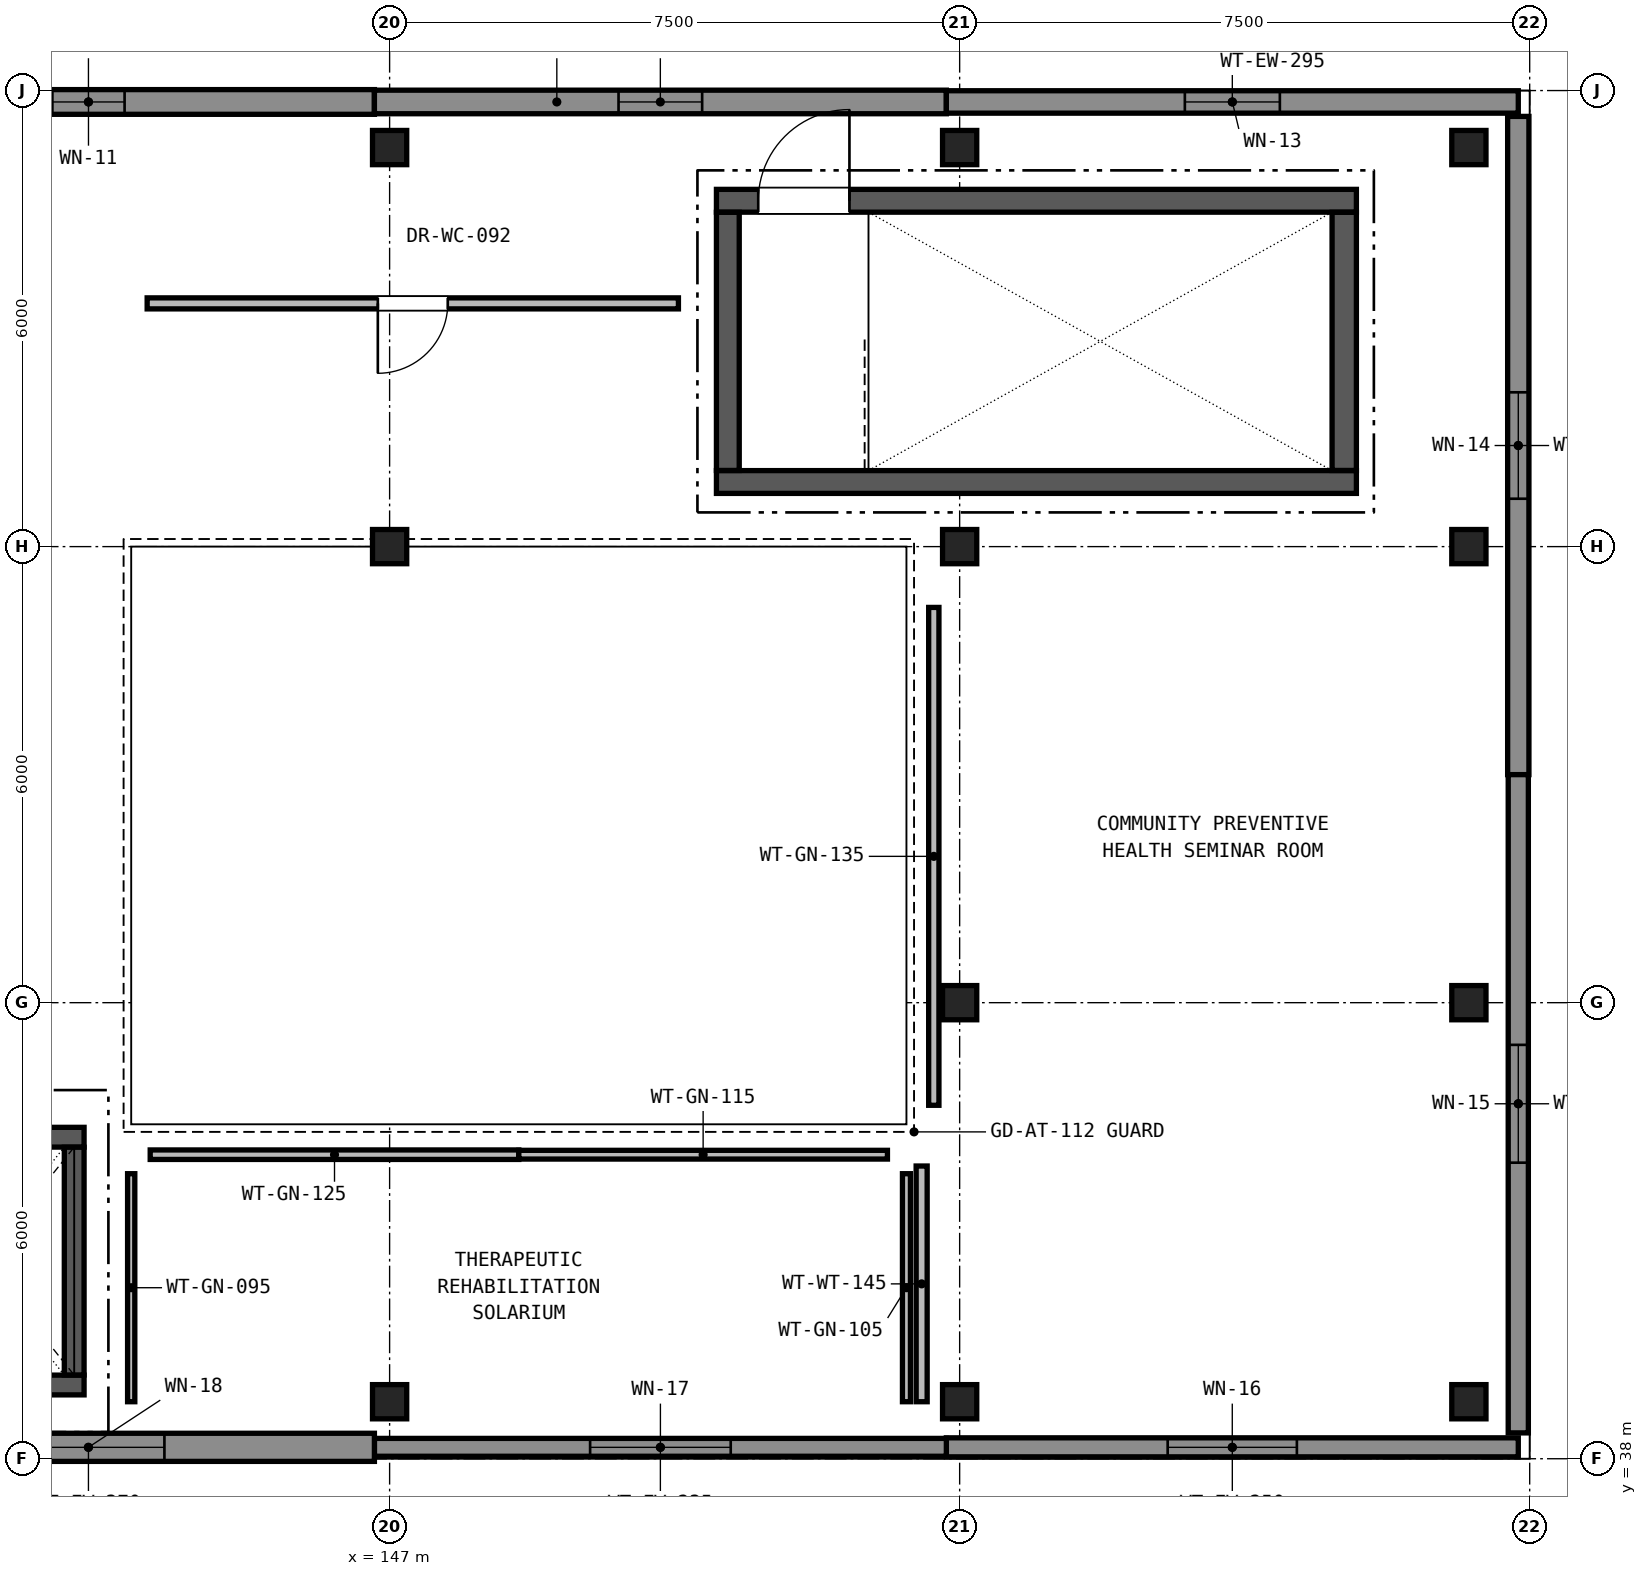
"""IFC4 building model, lengths in metres.
Left out: names, types, materials, properties, quantities, classifications, styles, units other than length and angle.
Written with IfcOpenShell. Run it as: python <this file> out.ifc"""

import sys

from ifc_helpers import new_model, si_unit, direction, frame, frame_2d, origin, origin_2d, place, context, subcontext, project, spatial, rectangle, extrude, element, fill, save


model = new_model("IFC4")
c1 = context("Model", 3, precision=1e-05, world=origin(), true_north=direction((0.0, 1.0)))
c2 = subcontext(c1, "Body", "Model", "MODEL_VIEW")
j1 = project(units=[si_unit("LENGTHUNIT", "METRE"), si_unit("PLANEANGLEUNIT", "RADIAN")], contexts=[c1])
p1 = place(None, origin())
s1 = spatial("IfcSite", under=j1, at=p1, CompositionType="ELEMENT")
p2 = place(p1, origin())
s2 = spatial("IfcBuilding", under=s1, at=p2, CompositionType="ELEMENT")
p3 = place(p2, frame((0.0, 0.0, 5.1)))
s3 = spatial("IfcBuildingStorey", under=s2, at=p3, CompositionType="ELEMENT", Elevation=5.1)
for number, where, z_axis, x_axis in (
    (1, (147.0, 38.75, 0.0), (0.0, 0.0, 1.0), (1.0, 0.0, 0.0)),
    (2, (147.0, 50.0, 0.0), (0.0, 0.0, 1.0), (1.0, 0.0, 0.0)),
    (3, (147.0, 55.25, 0.0), (0.0, 0.0, 1.0), (1.0, 0.0, 0.0)),
    (4, (154.5, 38.75, 0.0), (0.0, 0.0, 1.0), (1.0, 0.0, 0.0)),
    (5, (154.5, 50.0, 0.0), (0.0, 0.0, 1.0), (1.0, 0.0, 0.0)),
    (6, (154.5, 55.25, 0.0), (0.0, 0.0, 1.0), (1.0, 0.0, 0.0)),
    (7, (161.2, 38.75, 0.0), (0.0, 0.0, 1.0), (1.0, 0.0, 0.0)),
    (8, (161.2, 44.0, 0.0), (0.0, 0.0, 1.0), (1.0, 0.0, 0.0)),
    (9, (161.2, 50.0, 0.0), (0.0, 0.0, 1.0), (1.0, 0.0, 0.0)),
    (10, (161.2, 55.25, 0.0), (0.0, 0.0, 1.0), (1.0, 0.0, 0.0)),
    (11, (154.5, 44.0, 0.0), (0.0, 0.0, 1.0), (1.0, 0.0, 0.0)),
):
    element("IfcColumn", number, at=place(p3, frame(where, z_axis=z_axis, x_axis=x_axis)), inside=s3, PredefinedType="COLUMN", context=c2, shape_type="SweptSolid", body=[
        extrude(rectangle(XDim=0.45, YDim=0.45, at=origin_2d()), origin(), (0.0, 0.0, 1.0), 4.42),
    ])
p4 = place(p3, frame((139.275, 55.85, 0.0), z_axis=(0.0, 0.0, 1.0), x_axis=(1.0, 0.0, 0.0)))
e12 = element("IfcWall", 12, at=p4, inside=s3, PredefinedType="SOLIDWALL", context=c2, shape_type="SweptSolid", body=[
    extrude(rectangle(XDim=7.525, YDim=0.325, at=frame_2d((3.763, 0.0))), origin(), (0.0, 0.0, 1.0), 4.205),
])
p5 = place(p4, frame((3.288, 0.0, 0.9)))
e13 = element("IfcOpeningElement", 13, at=p5, cuts=e12, PredefinedType="OPENING", context=c2, shape_type="SweptSolid", body=[
    extrude(rectangle(XDim=0.95, YDim=1.75, at=frame_2d((0.475, 0.875))), frame((0.0, 0.172, 0.0), z_axis=(0.0, -1.0, 0.0), x_axis=(1.0, 0.0, 0.0)), (0.0, 0.0, 1.0), 0.345),
])
p6 = place(p3, frame((146.8, 55.85, 0.0), z_axis=(0.0, 0.0, 1.0), x_axis=(1.0, 0.0, 0.0)))
e14 = element("IfcWall", 14, at=p6, inside=s3, PredefinedType="SOLIDWALL", context=c2, shape_type="SweptSolid", body=[
    extrude(rectangle(XDim=7.525, YDim=0.31, at=frame_2d((3.762, 0.0))), origin(), (0.0, 0.0, 1.0), 4.205),
])
p7 = place(p6, frame((3.212, 0.0, 0.9)))
e15 = element("IfcOpeningElement", 15, at=p7, cuts=e14, PredefinedType="OPENING", context=c2, shape_type="SweptSolid", body=[
    extrude(rectangle(XDim=1.1, YDim=1.75, at=frame_2d((0.55, 0.875))), frame((0.0, 0.165, 0.0), z_axis=(0.0, -1.0, 0.0), x_axis=(1.0, 0.0, 0.0)), (0.0, 0.0, 1.0), 0.33),
])
p8 = place(p3, frame((154.325, 55.85, 0.0), z_axis=(0.0, 0.0, 1.0), x_axis=(1.0, 0.0, 0.0)))
e16 = element("IfcWall", 16, at=p8, inside=s3, PredefinedType="SOLIDWALL", context=c2, shape_type="SweptSolid", body=[
    extrude(rectangle(XDim=7.525, YDim=0.295, at=frame_2d((3.763, 0.0))), origin(), (0.0, 0.0, 1.0), 4.205),
])
p9 = place(p8, frame((3.138, 0.0, 0.9)))
e17 = element("IfcOpeningElement", 17, at=p9, cuts=e16, PredefinedType="OPENING", context=c2, shape_type="SweptSolid", body=[
    extrude(rectangle(XDim=1.25, YDim=1.75, at=frame_2d((0.625, 0.875))), frame((0.0, 0.157, 0.0), z_axis=(0.0, -1.0, 0.0), x_axis=(1.0, 0.0, 0.0)), (0.0, 0.0, 1.0), 0.315),
])
p10 = place(p3, frame((161.85, 55.66, 0.0), z_axis=(0.0, 0.0, 1.0), x_axis=(0.0, -1.0, 0.0)))
e18 = element("IfcWall", 18, at=p10, inside=s3, PredefinedType="SOLIDWALL", context=c2, shape_type="SweptSolid", body=[
    extrude(rectangle(XDim=8.66, YDim=0.28, at=frame_2d((4.33, 0.0))), origin(), (0.0, 0.0, 1.0), 4.205),
])
p11 = place(p10, frame((3.63, 0.0, 0.9)))
e19 = element("IfcOpeningElement", 19, at=p11, cuts=e18, PredefinedType="OPENING", context=c2, shape_type="SweptSolid", body=[
    extrude(rectangle(XDim=1.4, YDim=1.75, at=frame_2d((0.7, 0.875))), frame((0.0, 0.15, 0.0), z_axis=(0.0, -1.0, 0.0), x_axis=(1.0, 0.0, 0.0)), (0.0, 0.0, 1.0), 0.3),
])
p12 = place(p3, frame((161.85, 47.0, 0.0), z_axis=(0.0, 0.0, 1.0), x_axis=(0.0, -1.0, 0.0)))
e20 = element("IfcWall", 20, at=p12, inside=s3, PredefinedType="SOLIDWALL", context=c2, shape_type="SweptSolid", body=[
    extrude(rectangle(XDim=8.66, YDim=0.265, at=frame_2d((4.33, 0.0))), origin(), (0.0, 0.0, 1.0), 4.205),
])
p13 = place(p12, frame((3.555, 0.0, 0.9)))
e21 = element("IfcOpeningElement", 21, at=p13, cuts=e20, PredefinedType="OPENING", context=c2, shape_type="SweptSolid", body=[
    extrude(rectangle(XDim=1.55, YDim=1.75, at=frame_2d((0.775, 0.875))), frame((0.0, 0.142, 0.0), z_axis=(0.0, -1.0, 0.0), x_axis=(1.0, 0.0, 0.0)), (0.0, 0.0, 1.0), 0.285),
])
p14 = place(p3, frame((161.85, 38.15, 0.0), z_axis=(0.0, 0.0, 1.0), x_axis=(-1.0, 0.0, 0.0)))
e22 = element("IfcWall", 22, at=p14, inside=s3, PredefinedType="SOLIDWALL", context=c2, shape_type="SweptSolid", body=[
    extrude(rectangle(XDim=7.525, YDim=0.25, at=frame_2d((3.763, 0.0))), origin(), (0.0, 0.0, 1.0), 4.205),
])
p15 = place(p14, frame((2.913, 0.0, 0.9)))
e23 = element("IfcOpeningElement", 23, at=p15, cuts=e22, PredefinedType="OPENING", context=c2, shape_type="SweptSolid", body=[
    extrude(rectangle(XDim=1.7, YDim=1.75, at=frame_2d((0.85, 0.875))), frame((0.0, 0.135, 0.0), z_axis=(0.0, -1.0, 0.0), x_axis=(1.0, 0.0, 0.0)), (0.0, 0.0, 1.0), 0.27),
])
p16 = place(p3, frame((154.325, 38.15, 0.0), z_axis=(0.0, 0.0, 1.0), x_axis=(-1.0, 0.0, 0.0)))
e24 = element("IfcWall", 24, at=p16, inside=s3, PredefinedType="SOLIDWALL", context=c2, shape_type="SweptSolid", body=[
    extrude(rectangle(XDim=7.525, YDim=0.235, at=frame_2d((3.762, 0.0))), origin(), (0.0, 0.0, 1.0), 4.205),
])
p17 = place(p16, frame((2.837, 0.0, 0.9)))
e25 = element("IfcOpeningElement", 25, at=p17, cuts=e24, PredefinedType="OPENING", context=c2, shape_type="SweptSolid", body=[
    extrude(rectangle(XDim=1.85, YDim=1.75, at=frame_2d((0.925, 0.875))), frame((0.0, 0.127, 0.0), z_axis=(0.0, -1.0, 0.0), x_axis=(1.0, 0.0, 0.0)), (0.0, 0.0, 1.0), 0.255),
])
p18 = place(p3, frame((146.8, 38.15, 0.0), z_axis=(0.0, 0.0, 1.0), x_axis=(-1.0, 0.0, 0.0)))
e26 = element("IfcWall", 26, at=p18, inside=s3, PredefinedType="SOLIDWALL", context=c2, shape_type="SweptSolid", body=[
    extrude(rectangle(XDim=7.525, YDim=0.37, at=frame_2d((3.763, 0.0))), origin(), (0.0, 0.0, 1.0), 4.205),
])
p19 = place(p18, frame((2.763, 0.0, 0.9)))
e27 = element("IfcOpeningElement", 27, at=p19, cuts=e26, PredefinedType="OPENING", context=c2, shape_type="SweptSolid", body=[
    extrude(rectangle(XDim=2.0, YDim=1.75, at=frame_2d((1.0, 0.875))), frame((0.0, 0.195, 0.0), z_axis=(0.0, -1.0, 0.0), x_axis=(1.0, 0.0, 0.0)), (0.0, 0.0, 1.0), 0.39),
])
p20 = place(p3, frame((140.322, 38.97, 0.0), z_axis=(0.0, 0.0, 1.0), x_axis=(1.0, 0.0, 0.0)))
e28 = element("IfcWall", 28, at=p20, inside=s3, PredefinedType="SHEAR", context=c2, shape_type="SweptSolid", body=[
    extrude(rectangle(XDim=2.658, YDim=0.26, at=frame_2d((1.329, 0.0))), origin(), (0.0, 0.0, 1.0), 4.205),
])
p21 = place(p3, frame((140.322, 42.23, 0.0), z_axis=(0.0, 0.0, 1.0), x_axis=(1.0, 0.0, 0.0)))
e29 = element("IfcWall", 29, at=p21, inside=s3, PredefinedType="SHEAR", context=c2, shape_type="SweptSolid", body=[
    extrude(rectangle(XDim=2.658, YDim=0.26, at=frame_2d((1.329, 0.0))), origin(), (0.0, 0.0, 1.0), 4.205),
])
p22 = place(p21, frame((0.679, 0.0, 0.0)))
e30 = element("IfcOpeningElement", 30, at=p22, cuts=e29, PredefinedType="OPENING", context=c2, shape_type="SweptSolid", body=[
    extrude(rectangle(XDim=1.3, YDim=2.2, at=frame_2d((0.65, 1.1))), frame((0.0, 0.14, 0.0), z_axis=(0.0, -1.0, 0.0), x_axis=(1.0, 0.0, 0.0)), (0.0, 0.0, 1.0), 0.28),
])
p23 = place(p3, frame((142.85, 39.102, 0.0), z_axis=(0.0, 0.0, 1.0), x_axis=(0.0, 1.0, 0.0)))
e31 = element("IfcWall", 31, at=p23, inside=s3, PredefinedType="SHEAR", context=c2, shape_type="SweptSolid", body=[
    extrude(rectangle(XDim=2.996, YDim=0.26, at=frame_2d((1.498, 0.0))), origin(), (0.0, 0.0, 1.0), 4.205),
])
p24 = place(p3, frame((151.3, 50.85, 0.0), z_axis=(0.0, 0.0, 1.0), x_axis=(1.0, 0.0, 0.0)))
e32 = element("IfcWall", 32, at=p24, inside=s3, PredefinedType="SHEAR", context=c2, shape_type="SweptSolid", body=[
    extrude(rectangle(XDim=8.42, YDim=0.3, at=frame_2d((4.21, 0.0))), origin(), (0.0, 0.0, 1.0), 4.205),
])
p25 = place(p3, frame((151.3, 54.55, 0.0), z_axis=(0.0, 0.0, 1.0), x_axis=(1.0, 0.0, 0.0)))
e33 = element("IfcWall", 33, at=p25, inside=s3, PredefinedType="SHEAR", context=c2, shape_type="SweptSolid", body=[
    extrude(rectangle(XDim=8.42, YDim=0.3, at=frame_2d((4.21, 0.0))), origin(), (0.0, 0.0, 1.0), 4.205),
])
p26 = place(p25, frame((0.55, 0.0, 0.0)))
e34 = element("IfcOpeningElement", 34, at=p26, cuts=e33, PredefinedType="OPENING", context=c2, shape_type="SweptSolid", body=[
    extrude(rectangle(XDim=1.2, YDim=2.2, at=frame_2d((0.6, 1.1))), frame((0.0, 0.16, 0.0), z_axis=(0.0, -1.0, 0.0), x_axis=(1.0, 0.0, 0.0)), (0.0, 0.0, 1.0), 0.32),
])
p27 = place(p3, frame((151.45, 51.002, 0.0), z_axis=(0.0, 0.0, 1.0), x_axis=(0.0, 1.0, 0.0)))
e35 = element("IfcWall", 35, at=p27, inside=s3, PredefinedType="SHEAR", context=c2, shape_type="SweptSolid", body=[
    extrude(rectangle(XDim=3.396, YDim=0.3, at=frame_2d((1.698, 0.0))), origin(), (0.0, 0.0, 1.0), 4.205),
])
p28 = place(p3, frame((159.56, 51.002, 0.0), z_axis=(0.0, 0.0, 1.0), x_axis=(0.0, 1.0, 0.0)))
e36 = element("IfcWall", 36, at=p28, inside=s3, PredefinedType="SHEAR", context=c2, shape_type="SweptSolid", body=[
    extrude(rectangle(XDim=3.396, YDim=0.32, at=frame_2d((1.698, 0.0))), origin(), (0.0, 0.0, 1.0), 4.205),
])
p29 = place(p3, frame((154.0, 38.75, 0.0), z_axis=(0.0, 0.0, 1.0), x_axis=(0.0, 1.0, 0.0)))
e37 = element("IfcWall", 37, at=p29, inside=s3, PredefinedType="PARTITIONING", context=c2, shape_type="SweptSolid", body=[
    extrude(rectangle(XDim=3.101, YDim=0.145, at=frame_2d((1.551, 0.0))), origin(), (0.0, 0.0, 1.0), 3.455),
])
p30 = place(p3, frame((154.16, 42.65, 0.0), z_axis=(0.0, 0.0, 1.0), x_axis=(0.0, 1.0, 0.0)))
e38 = element("IfcWall", 38, at=p30, inside=s3, PredefinedType="PARTITIONING", context=c2, shape_type="SweptSolid", body=[
    extrude(rectangle(XDim=6.55, YDim=0.135, at=frame_2d((3.275, 0.0))), origin(), (0.0, 0.0, 1.0), 4.205),
])
p31 = place(p3, frame((143.85, 42.0, 0.0), z_axis=(0.0, 0.0, 1.0), x_axis=(1.0, 0.0, 0.0)))
e39 = element("IfcWall", 39, at=p31, inside=s3, PredefinedType="PARTITIONING", context=c2, shape_type="SweptSolid", body=[
    extrude(rectangle(XDim=4.85, YDim=0.125, at=frame_2d((2.425, 0.0))), origin(), (0.0, 0.0, 1.0), 3.891),
])
p32 = place(p3, frame((148.7, 42.0, 0.0), z_axis=(0.0, 0.0, 1.0), x_axis=(1.0, 0.0, 0.0)))
e40 = element("IfcWall", 40, at=p32, inside=s3, PredefinedType="PARTITIONING", context=c2, shape_type="SweptSolid", body=[
    extrude(rectangle(XDim=4.85, YDim=0.115, at=frame_2d((2.425, 0.0))), origin(), (0.0, 0.0, 1.0), 4.205),
])
p33 = place(p3, frame((153.8, 41.75, 0.0), z_axis=(0.0, 0.0, 1.0), x_axis=(0.0, -1.0, 0.0)))
e41 = element("IfcWall", 41, at=p33, inside=s3, PredefinedType="PARTITIONING", context=c2, shape_type="SweptSolid", body=[
    extrude(rectangle(XDim=3.0, YDim=0.105, at=frame_2d((1.5, 0.0))), origin(), (0.0, 0.0, 1.0), 3.455),
])
p34 = place(p3, frame((143.6, 38.75, 0.0), z_axis=(0.0, 0.0, 1.0), x_axis=(0.0, 1.0, 0.0)))
e42 = element("IfcWall", 42, at=p34, inside=s3, PredefinedType="PARTITIONING", context=c2, shape_type="SweptSolid", body=[
    extrude(rectangle(XDim=3.0, YDim=0.095, at=frame_2d((1.5, 0.0))), origin(), (0.0, 0.0, 1.0), 4.205),
])
p35 = place(p3, frame((150.8, 53.2, 0.0), z_axis=(0.0, 0.0, 1.0), x_axis=(-1.0, 0.0, 0.0)))
e43 = element("IfcWall", 43, at=p35, inside=s3, PredefinedType="PARTITIONING", context=c2, shape_type="SweptSolid", body=[
    extrude(rectangle(XDim=6.99, YDim=0.145, at=frame_2d((3.495, 0.0))), origin(), (0.0, 0.0, 1.0), 3.891),
])
p36 = place(p35, frame((3.035, 0.0, 0.0)))
e44 = element("IfcOpeningElement", 44, at=p36, cuts=e43, PredefinedType="OPENING", context=c2, shape_type="SweptSolid", body=[
    extrude(rectangle(XDim=0.92, YDim=2.12, at=frame_2d((0.46, 1.06))), frame((0.0, 0.083, 0.0), z_axis=(0.0, -1.0, 0.0), x_axis=(1.0, 0.0, 0.0)), (0.0, 0.0, 1.0), 0.165),
])
p37 = place(p5, origin())
e45 = element("IfcWindow", 45, at=p37, inside=s3, PartitioningType="SINGLE_PANEL", PredefinedType="WINDOW", context=c2, shape_type="SweptSolid", body=[
    extrude(rectangle(XDim=0.95, YDim=1.75, at=frame_2d((0.475, 0.875))), frame((0.0, 0.03, 0.0), z_axis=(0.0, -1.0, 0.0), x_axis=(1.0, 0.0, 0.0)), (0.0, 0.0, 1.0), 0.06),
])
fill(e13, e45)
p38 = place(p7, origin())
e46 = element("IfcWindow", 46, at=p38, inside=s3, PartitioningType="SINGLE_PANEL", PredefinedType="WINDOW", context=c2, shape_type="SweptSolid", body=[
    extrude(rectangle(XDim=1.1, YDim=1.75, at=frame_2d((0.55, 0.875))), frame((0.0, 0.03, 0.0), z_axis=(0.0, -1.0, 0.0), x_axis=(1.0, 0.0, 0.0)), (0.0, 0.0, 1.0), 0.06),
])
fill(e15, e46)
p39 = place(p9, origin())
e47 = element("IfcWindow", 47, at=p39, inside=s3, PartitioningType="SINGLE_PANEL", PredefinedType="WINDOW", context=c2, shape_type="SweptSolid", body=[
    extrude(rectangle(XDim=1.25, YDim=1.75, at=frame_2d((0.625, 0.875))), frame((0.0, 0.03, 0.0), z_axis=(0.0, -1.0, 0.0), x_axis=(1.0, 0.0, 0.0)), (0.0, 0.0, 1.0), 0.06),
])
fill(e17, e47)
p40 = place(p11, origin())
e48 = element("IfcWindow", 48, at=p40, inside=s3, PartitioningType="SINGLE_PANEL", PredefinedType="WINDOW", context=c2, shape_type="SweptSolid", body=[
    extrude(rectangle(XDim=1.4, YDim=1.75, at=frame_2d((0.7, 0.875))), frame((0.0, 0.03, 0.0), z_axis=(0.0, -1.0, 0.0), x_axis=(1.0, 0.0, 0.0)), (0.0, 0.0, 1.0), 0.06),
])
fill(e19, e48)
p41 = place(p13, origin())
e49 = element("IfcWindow", 49, at=p41, inside=s3, PartitioningType="SINGLE_PANEL", PredefinedType="WINDOW", context=c2, shape_type="SweptSolid", body=[
    extrude(rectangle(XDim=1.55, YDim=1.75, at=frame_2d((0.775, 0.875))), frame((0.0, 0.03, 0.0), z_axis=(0.0, -1.0, 0.0), x_axis=(1.0, 0.0, 0.0)), (0.0, 0.0, 1.0), 0.06),
])
fill(e21, e49)
p42 = place(p15, origin())
e50 = element("IfcWindow", 50, at=p42, inside=s3, PartitioningType="SINGLE_PANEL", PredefinedType="WINDOW", context=c2, shape_type="SweptSolid", body=[
    extrude(rectangle(XDim=1.7, YDim=1.75, at=frame_2d((0.85, 0.875))), frame((0.0, 0.03, 0.0), z_axis=(0.0, -1.0, 0.0), x_axis=(1.0, 0.0, 0.0)), (0.0, 0.0, 1.0), 0.06),
])
fill(e23, e50)
p43 = place(p17, origin())
e51 = element("IfcWindow", 51, at=p43, inside=s3, PartitioningType="SINGLE_PANEL", PredefinedType="WINDOW", context=c2, shape_type="SweptSolid", body=[
    extrude(rectangle(XDim=1.85, YDim=1.75, at=frame_2d((0.925, 0.875))), frame((0.0, 0.03, 0.0), z_axis=(0.0, -1.0, 0.0), x_axis=(1.0, 0.0, 0.0)), (0.0, 0.0, 1.0), 0.06),
])
fill(e25, e51)
p44 = place(p19, origin())
e52 = element("IfcWindow", 52, at=p44, inside=s3, PartitioningType="SINGLE_PANEL", PredefinedType="WINDOW", context=c2, shape_type="SweptSolid", body=[
    extrude(rectangle(XDim=2.0, YDim=1.75, at=frame_2d((1.0, 0.875))), frame((0.0, 0.03, 0.0), z_axis=(0.0, -1.0, 0.0), x_axis=(1.0, 0.0, 0.0)), (0.0, 0.0, 1.0), 0.06),
])
fill(e27, e52)
p45 = place(p26, origin())
e53 = element("IfcDoor", 53, at=p45, inside=s3, OperationType="SINGLE_SWING_RIGHT", PredefinedType="DOOR", context=c2, shape_type="SweptSolid", body=[
    extrude(rectangle(XDim=1.2, YDim=2.2, at=frame_2d((0.6, 1.1))), frame((0.0, 0.025, 0.0), z_axis=(0.0, -1.0, 0.0), x_axis=(1.0, 0.0, 0.0)), (0.0, 0.0, 1.0), 0.05),
])
fill(e34, e53)
p46 = place(p36, origin())
e54 = element("IfcDoor", 54, at=p46, inside=s3, OperationType="SINGLE_SWING_RIGHT", PredefinedType="DOOR", context=c2, shape_type="SweptSolid", body=[
    extrude(rectangle(XDim=0.92, YDim=2.12, at=frame_2d((0.46, 1.06))), frame((0.0, 0.025, 0.0), z_axis=(0.0, -1.0, 0.0), x_axis=(1.0, 0.0, 0.0)), (0.0, 0.0, 1.0), 0.05),
])
fill(e44, e54)
save(model, sys.argv[1])
